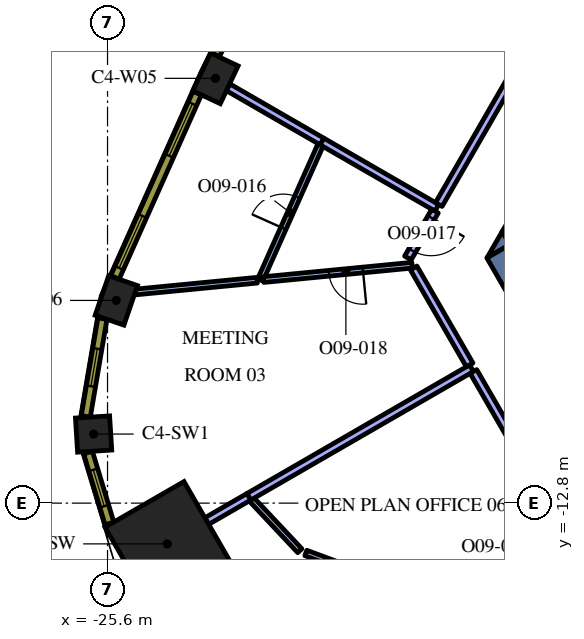
"""IFC4 building model, lengths in metres.
Left out: names, types, materials, properties, quantities, classifications, styles, units other than length and angle.
Written with IfcOpenShell. Run it as: python <this file> out.ifc"""

import sys

from ifc_helpers import new_model, si_unit, direction, frame, frame_2d, origin, origin_2d, place, context, subcontext, project, spatial, polyline, rectangle, outline, extrude, element, fill, save


model = new_model("IFC4")
c1 = context("Model", 3, precision=1e-05, world=origin(), true_north=direction((0.0, 1.0)))
c2 = subcontext(c1, "Body", "Model", "MODEL_VIEW")
j1 = project(units=[si_unit("LENGTHUNIT", "METRE"), si_unit("PLANEANGLEUNIT", "RADIAN")], contexts=[c1])
p1 = place(None, origin())
s1 = spatial("IfcSite", under=j1, at=p1, CompositionType="ELEMENT")
p2 = place(p1, origin())
s2 = spatial("IfcBuilding", under=s1, at=p2, CompositionType="ELEMENT")
p3 = place(p2, frame((0.0, 0.0, 239.4)))
s3 = spatial("IfcBuildingStorey", under=s2, at=p3, CompositionType="ELEMENT", Elevation=239.4)
p4 = place(p3, frame((-24.027, -13.872, 0.0), z_axis=(0.0, 0.0, 1.0), x_axis=(-0.866025403784, -0.5, 0.0)))
e1 = element("IfcColumn", 1, at=p4, inside=s3, PredefinedType="COLUMN", context=c2, shape_type="SweptSolid", body=[
    extrude(rectangle(XDim=2.4, YDim=2.4, at=origin_2d()), origin(), (0.0, 0.0, 1.0), 4.2),
])
for number, where, z_axis, x_axis in (
    (2, (-22.76, -1.623, 0.0), (0.0, 0.0, 1.0), (-0.426, -0.905, 0.0)),
    (3, (-25.369, -7.466, 0.0), (0.0, 0.0, 1.0), (-0.324, -0.946, 0.0)),
):
    element("IfcColumn", number, at=place(p3, frame(where, z_axis=z_axis, x_axis=x_axis)), inside=s3, PredefinedType="COLUMN", context=c2, shape_type="SweptSolid", body=[
        extrude(rectangle(XDim=1.1, YDim=0.8, at=origin_2d()), origin(), (0.0, 0.0, 1.0), 4.2),
    ])
p5 = place(p3, frame((-25.967, -10.982, 0.0), z_axis=(0.0, 0.0, 1.0), x_axis=(0.062217428964, -0.998062619044, 0.0)))
e4 = element("IfcColumn", 4, at=p5, inside=s3, PredefinedType="COLUMN", context=c2, shape_type="SweptSolid", body=[
    extrude(rectangle(XDim=0.9, YDim=0.9, at=origin_2d()), origin(), (0.0, 0.0, 1.0), 4.2),
])
p6 = place(p3, frame((-13.402, -9.487, 0.0), z_axis=(0.0, 0.0, 1.0), x_axis=(-0.500020498207, 0.866013568815, 0.0)))
e5 = element("IfcWall", 5, at=p6, inside=s3, PredefinedType="SOLIDWALL", context=c2, shape_type="SweptSolid", body=[
    extrude(rectangle(XDim=3.829, YDim=0.7, at=frame_2d((1.915, 0.0))), origin(), (0.0, 0.0, 1.0), 4.2),
])
p7 = place(p3, origin())
e6 = element("IfcWall", 6, at=p7, inside=s3, PredefinedType="SOLIDWALL", context=c2, shape_type="SweptSolid", body=[
    extrude(outline(polyline([(-15.014, -5.995), (-15.611, -6.339), (-15.213, -5.65), (-15.014, -5.995)])), origin(), (0.0, 0.0, 1.0), 4.2),
])
p8 = place(p3, frame((-13.475, -3.339, 0.0), z_axis=(0.0, 0.0, 1.0), x_axis=(-0.499944726303, -0.866057313716, 0.0)))
e7 = element("IfcWall", 7, at=p8, inside=s3, PredefinedType="SOLIDWALL", context=c2, shape_type="SweptSolid", body=[
    extrude(rectangle(XDim=2.884, YDim=0.7, at=frame_2d((1.442, 0.0))), origin(), (0.0, 0.0, 1.0), 4.2),
])
e8 = element("IfcWall", 8, at=p7, inside=s3, PredefinedType="SOLIDWALL", context=c2, shape_type="SweptSolid", body=[
    extrude(outline(polyline([(-14.809, -6.35), (-15.197, -5.678), (-14.615, -6.014), (-14.809, -6.35)])), origin(), (0.0, 0.0, 1.0), 4.2),
])
p9 = place(p3, frame((-19.951, -3.288, 0.0), z_axis=(0.0, 0.0, 1.0), x_axis=(-0.866044908516, 0.499966215292, 0.0)))
e9 = element("IfcWall", 9, at=p9, inside=s3, PredefinedType="PARTITIONING", context=c2, shape_type="SweptSolid", body=[
    extrude(rectangle(XDim=2.861, YDim=0.2, at=frame_2d((1.431, 0.0))), origin(), (0.0, 0.0, 1.0), 3.45),
])
p10 = place(p3, frame((-16.934, -5.03, 0.0), z_axis=(0.0, 0.0, 1.0), x_axis=(-0.866031916153, 0.499988720078, 0.0)))
e10 = element("IfcWall", 10, at=p10, inside=s3, PredefinedType="PARTITIONING", context=c2, shape_type="SweptSolid", body=[
    extrude(rectangle(XDim=3.492, YDim=0.2, at=frame_2d((1.746, 0.0))), origin(), (0.0, 0.0, 1.0), 3.45),
])
p11 = place(p3, frame((-14.037, -0.013, 0.0), z_axis=(0.0, 0.0, 1.0), x_axis=(-0.500018205831, -0.866014892388, 0.0)))
e11 = element("IfcWall", 11, at=p11, inside=s3, PredefinedType="PARTITIONING", context=c2, shape_type="SweptSolid", body=[
    extrude(rectangle(XDim=5.693, YDim=0.2, at=frame_2d((2.846, 0.0))), origin(), (0.0, 0.0, 1.0), 3.45),
])
p12 = place(p3, frame((-21.58, -6.927, 0.0), z_axis=(0.0, 0.0, 1.0), x_axis=(0.407612492408, 0.913155001099, 0.0)))
e12 = element("IfcWall", 12, at=p12, inside=s3, PredefinedType="PARTITIONING", context=c2, shape_type="SweptSolid", body=[
    extrude(rectangle(XDim=3.887, YDim=0.15, at=frame_2d((1.943, 0.0))), origin(), (0.0, 0.0, 1.0), 3.45),
])
p13 = place(p12, frame((1.487, 0.0, 0.0)))
e13 = element("IfcOpeningElement", 13, at=p13, cuts=e12, PredefinedType="OPENING", context=c2, shape_type="SweptSolid", body=[
    extrude(rectangle(XDim=0.9, YDim=2.1, at=frame_2d((0.45, 1.05))), frame((0.0, 0.085, 0.0), z_axis=(0.0, -1.0, 0.0), x_axis=(1.0, 0.0, 0.0)), (0.0, 0.0, 1.0), 0.17),
])
p14 = place(p3, frame((-21.666, -6.935, 0.0), z_axis=(0.0, 0.0, 1.0), x_axis=(-0.995359155707, -0.096229679155, 0.0)))
e14 = element("IfcWall", 14, at=p14, inside=s3, PredefinedType="PARTITIONING", context=c2, shape_type="SweptSolid", body=[
    extrude(rectangle(XDim=3.219, YDim=0.15, at=frame_2d((1.61, 0.0))), origin(), (0.0, 0.0, 1.0), 3.45),
])
p15 = place(p3, frame((-17.586, -6.54, 0.0), z_axis=(0.0, 0.0, 1.0), x_axis=(-0.995356357863, -0.096258614479, 0.0)))
e15 = element("IfcWall", 15, at=p15, inside=s3, PredefinedType="PARTITIONING", context=c2, shape_type="SweptSolid", body=[
    extrude(rectangle(XDim=3.926, YDim=0.15, at=frame_2d((1.963, 0.0))), origin(), (0.0, 0.0, 1.0), 3.45),
])
p16 = place(p15, frame((1.3, 0.0, 0.0)))
e16 = element("IfcOpeningElement", 16, at=p16, cuts=e15, PredefinedType="OPENING", context=c2, shape_type="SweptSolid", body=[
    extrude(rectangle(XDim=0.9, YDim=2.1, at=frame_2d((0.45, 1.05))), frame((0.0, 0.085, 0.0), z_axis=(0.0, -1.0, 0.0), x_axis=(1.0, 0.0, 0.0)), (0.0, 0.0, 1.0), 0.17),
])
p17 = place(p3, frame((-16.983, -5.116, 0.0), z_axis=(0.0, 0.0, 1.0), x_axis=(-0.500009219579, -0.866020080793, 0.0)))
e17 = element("IfcWall", 17, at=p17, inside=s3, PredefinedType="PARTITIONING", context=c2, shape_type="SweptSolid", body=[
    extrude(rectangle(XDim=1.425, YDim=0.2, at=frame_2d((0.712, 0.0))), origin(), (0.0, 0.0, 1.0), 3.45),
])
p18 = place(p17, frame((0.2, 0.0, 0.0)))
e18 = element("IfcOpeningElement", 18, at=p18, cuts=e17, PredefinedType="OPENING", context=c2, shape_type="SweptSolid", body=[
    extrude(rectangle(XDim=1.0, YDim=2.1, at=frame_2d((0.5, 1.05))), frame((0.0, 0.11, 0.0), z_axis=(0.0, -1.0, 0.0), x_axis=(1.0, 0.0, 0.0)), (0.0, 0.0, 1.0), 0.22),
])
p19 = place(p3, frame((-21.873, -12.628, 0.0), z_axis=(0.0, 0.0, 1.0), x_axis=(-0.866052988967, -0.499952218018, 0.0)))
e19 = element("IfcWall", 19, at=p19, inside=s3, PredefinedType="PARTITIONING", context=c2, shape_type="SweptSolid", body=[
    extrude(rectangle(XDim=1.288, YDim=0.2, at=frame_2d((0.644, 0.0))), origin(), (0.0, 0.0, 1.0), 3.45),
])
p20 = place(p3, frame((-16.021, -9.25, 0.0), z_axis=(0.0, 0.0, 1.0), x_axis=(-0.86602692059, -0.499997372806, 0.0)))
e20 = element("IfcWall", 20, at=p20, inside=s3, PredefinedType="PARTITIONING", context=c2, shape_type="SweptSolid", body=[
    extrude(rectangle(XDim=6.765, YDim=0.2, at=frame_2d((3.382, 0.0))), origin(), (0.0, 0.0, 1.0), 3.45),
])
p21 = place(p3, frame((-17.545, -6.612, 0.0), z_axis=(0.0, 0.0, 1.0), x_axis=(0.500006981563, -0.86602137294, 0.0)))
e21 = element("IfcWall", 21, at=p21, inside=s3, PredefinedType="PARTITIONING", context=c2, shape_type="SweptSolid", body=[
    extrude(rectangle(XDim=2.946, YDim=0.2, at=frame_2d((1.473, 0.0))), origin(), (0.0, 0.0, 1.0), 3.45),
])
p22 = place(p3, frame((-21.806, -12.705, 0.0), z_axis=(0.0, 0.0, 1.0), x_axis=(0.684700980092, -0.728824099396, 0.0)))
e22 = element("IfcWall", 22, at=p22, inside=s3, PredefinedType="PARTITIONING", context=c2, shape_type="SweptSolid", body=[
    extrude(rectangle(XDim=1.848, YDim=0.15, at=frame_2d((0.924, 0.0))), origin(), (0.0, 0.0, 1.0), 3.45),
])
p23 = place(p3, frame((-20.383, -14.111, 0.0), z_axis=(0.0, 0.0, 1.0), x_axis=(0.937598383102, -0.347720105838, 0.0)))
e23 = element("IfcWall", 23, at=p23, inside=s3, PredefinedType="PARTITIONING", context=c2, shape_type="SweptSolid", body=[
    extrude(rectangle(XDim=2.156, YDim=0.15, at=frame_2d((1.078, 0.0))), origin(), (0.0, 0.0, 1.0), 3.45),
])
p24 = place(p3, frame((-15.971, -9.337, 0.0), z_axis=(0.0, 0.0, 1.0), x_axis=(0.500010870188, -0.866019127788, 0.0)))
e24 = element("IfcWall", 24, at=p24, inside=s3, PredefinedType="PARTITIONING", context=c2, shape_type="SweptSolid", body=[
    extrude(rectangle(XDim=3.249, YDim=0.2, at=frame_2d((1.624, 0.0))), origin(), (0.0, 0.0, 1.0), 3.45),
])
p25 = place(p3, frame((-20.407, 3.74, 0.0), z_axis=(0.0, 0.0, 1.0), x_axis=(-0.445129582031, -0.895466166419, 0.0)))
e25 = element("IfcWall", 25, at=p25, inside=s3, PredefinedType="SOLIDWALL", context=c2, shape_type="SweptSolid", body=[
    extrude(rectangle(XDim=5.298, YDim=0.24, at=frame_2d((2.649, 0.0))), origin(), (0.0, 0.0, 1.0), 3.95),
])
p26 = place(p25, frame((0.295, 0.0, 0.9)))
e26 = element("IfcOpeningElement", 26, at=p26, cuts=e25, PredefinedType="OPENING", context=c2, shape_type="SweptSolid", body=[
    extrude(rectangle(XDim=1.5, YDim=2.55, at=frame_2d((0.75, 1.275))), frame((0.0, 0.13, 0.0), z_axis=(0.0, -1.0, 0.0), x_axis=(1.0, 0.0, 0.0)), (0.0, 0.0, 1.0), 0.26),
])
p27 = place(p25, frame((3.504, 0.0, 0.9)))
e27 = element("IfcOpeningElement", 27, at=p27, cuts=e25, PredefinedType="OPENING", context=c2, shape_type="SweptSolid", body=[
    extrude(rectangle(XDim=1.5, YDim=2.55, at=frame_2d((0.75, 1.275))), frame((0.0, 0.13, 0.0), z_axis=(0.0, -1.0, 0.0), x_axis=(1.0, 0.0, 0.0)), (0.0, 0.0, 1.0), 0.26),
])
p28 = place(p3, frame((-23.24, -2.011, 0.0), z_axis=(0.0, 0.0, 1.0), x_axis=(-0.407579651789, -0.913169659728, 0.0)))
e28 = element("IfcWall", 28, at=p28, inside=s3, PredefinedType="SOLIDWALL", context=c2, shape_type="SweptSolid", body=[
    extrude(rectangle(XDim=5.311, YDim=0.24, at=frame_2d((2.655, 0.0))), origin(), (0.0, 0.0, 1.0), 3.95),
])
p29 = place(p28, frame((0.306, 0.0, 0.9)))
e29 = element("IfcOpeningElement", 29, at=p29, cuts=e28, PredefinedType="OPENING", context=c2, shape_type="SweptSolid", body=[
    extrude(rectangle(XDim=1.5, YDim=2.55, at=frame_2d((0.75, 1.275))), frame((0.0, 0.13, 0.0), z_axis=(0.0, -1.0, 0.0), x_axis=(1.0, 0.0, 0.0)), (0.0, 0.0, 1.0), 0.26),
])
p30 = place(p28, frame((3.539, 0.0, 0.9)))
e30 = element("IfcOpeningElement", 30, at=p30, cuts=e28, PredefinedType="OPENING", context=c2, shape_type="SweptSolid", body=[
    extrude(rectangle(XDim=1.5, YDim=2.55, at=frame_2d((0.75, 1.275))), frame((0.0, 0.13, 0.0), z_axis=(0.0, -1.0, 0.0), x_axis=(1.0, 0.0, 0.0)), (0.0, 0.0, 1.0), 0.26),
])
p31 = place(p3, frame((-25.734, -7.945, 0.0), z_axis=(0.0, 0.0, 1.0), x_axis=(-0.167660055546, -0.985844869021, 0.0)))
e31 = element("IfcWall", 31, at=p31, inside=s3, PredefinedType="SOLIDWALL", context=c2, shape_type="SweptSolid", body=[
    extrude(rectangle(XDim=2.609, YDim=0.24, at=frame_2d((1.305, 0.0))), origin(), (0.0, 0.0, 1.0), 3.95),
])
p32 = place(p31, frame((0.805, 0.0, 0.9)))
e32 = element("IfcOpeningElement", 32, at=p32, cuts=e31, PredefinedType="OPENING", context=c2, shape_type="SweptSolid", body=[
    extrude(rectangle(XDim=1.0, YDim=2.55, at=frame_2d((0.5, 1.275))), frame((0.0, 0.13, 0.0), z_axis=(0.0, -1.0, 0.0), x_axis=(1.0, 0.0, 0.0)), (0.0, 0.0, 1.0), 0.26),
])
p33 = place(p3, frame((-26.112, -11.469, 0.0), z_axis=(0.0, 0.0, 1.0), x_axis=(0.288727209095, -0.957411405159, 0.0)))
e33 = element("IfcWall", 33, at=p33, inside=s3, PredefinedType="SOLIDWALL", context=c2, shape_type="SweptSolid", body=[
    extrude(rectangle(XDim=1.948, YDim=0.24, at=frame_2d((0.974, 0.0))), origin(), (0.0, 0.0, 1.0), 3.95),
])
p34 = place(p33, frame((0.474, 0.0, 0.9)))
e34 = element("IfcOpeningElement", 34, at=p34, cuts=e33, PredefinedType="OPENING", context=c2, shape_type="SweptSolid", body=[
    extrude(rectangle(XDim=1.0, YDim=2.55, at=frame_2d((0.5, 1.275))), frame((0.0, 0.13, 0.0), z_axis=(0.0, -1.0, 0.0), x_axis=(1.0, 0.0, 0.0)), (0.0, 0.0, 1.0), 0.26),
])
p35 = place(p13, origin())
e35 = element("IfcDoor", 35, at=p35, inside=s3, OperationType="SINGLE_SWING_LEFT", PredefinedType="DOOR", context=c2, shape_type="SweptSolid", body=[
    extrude(rectangle(XDim=0.9, YDim=2.1, at=frame_2d((0.45, 1.05))), frame((0.0, 0.025, 0.0), z_axis=(0.0, -1.0, 0.0), x_axis=(1.0, 0.0, 0.0)), (0.0, 0.0, 1.0), 0.05),
])
fill(e13, e35)
p36 = place(p18, origin())
e36 = element("IfcDoor", 36, at=p36, inside=s3, OperationType="SINGLE_SWING_LEFT", PredefinedType="DOOR", context=c2, shape_type="SweptSolid", body=[
    extrude(rectangle(XDim=1.0, YDim=2.1, at=frame_2d((0.5, 1.05))), frame((0.0, 0.025, 0.0), z_axis=(0.0, -1.0, 0.0), x_axis=(1.0, 0.0, 0.0)), (0.0, 0.0, 1.0), 0.05),
])
fill(e18, e36)
p37 = place(p16, origin())
e37 = element("IfcDoor", 37, at=p37, inside=s3, OperationType="SINGLE_SWING_LEFT", PredefinedType="DOOR", context=c2, shape_type="SweptSolid", body=[
    extrude(rectangle(XDim=0.9, YDim=2.1, at=frame_2d((0.45, 1.05))), frame((0.0, 0.025, 0.0), z_axis=(0.0, -1.0, 0.0), x_axis=(1.0, 0.0, 0.0)), (0.0, 0.0, 1.0), 0.05),
])
fill(e16, e37)
p38 = place(p29, origin())
e38 = element("IfcWindow", 38, at=p38, inside=s3, PartitioningType="SINGLE_PANEL", PredefinedType="WINDOW", context=c2, shape_type="SweptSolid", body=[
    extrude(rectangle(XDim=1.5, YDim=2.55, at=frame_2d((0.75, 1.275))), frame((0.0, 0.04, 0.0), z_axis=(0.0, -1.0, 0.0), x_axis=(1.0, 0.0, 0.0)), (0.0, 0.0, 1.0), 0.06),
])
fill(e29, e38)
p39 = place(p30, origin())
e39 = element("IfcWindow", 39, at=p39, inside=s3, PartitioningType="SINGLE_PANEL", PredefinedType="WINDOW", context=c2, shape_type="SweptSolid", body=[
    extrude(rectangle(XDim=1.5, YDim=2.55, at=frame_2d((0.75, 1.275))), frame((0.0, 0.04, 0.0), z_axis=(0.0, -1.0, 0.0), x_axis=(1.0, 0.0, 0.0)), (0.0, 0.0, 1.0), 0.06),
])
fill(e30, e39)
p40 = place(p32, origin())
e40 = element("IfcWindow", 40, at=p40, inside=s3, PartitioningType="SINGLE_PANEL", PredefinedType="WINDOW", context=c2, shape_type="SweptSolid", body=[
    extrude(rectangle(XDim=1.0, YDim=2.55, at=frame_2d((0.5, 1.275))), frame((0.0, 0.04, 0.0), z_axis=(0.0, -1.0, 0.0), x_axis=(1.0, 0.0, 0.0)), (0.0, 0.0, 1.0), 0.06),
])
fill(e32, e40)
p41 = place(p34, origin())
e41 = element("IfcWindow", 41, at=p41, inside=s3, PartitioningType="SINGLE_PANEL", PredefinedType="WINDOW", context=c2, shape_type="SweptSolid", body=[
    extrude(rectangle(XDim=1.0, YDim=2.55, at=frame_2d((0.5, 1.275))), frame((0.0, 0.04, 0.0), z_axis=(0.0, -1.0, 0.0), x_axis=(1.0, 0.0, 0.0)), (0.0, 0.0, 1.0), 0.06),
])
fill(e34, e41)
save(model, sys.argv[1])
